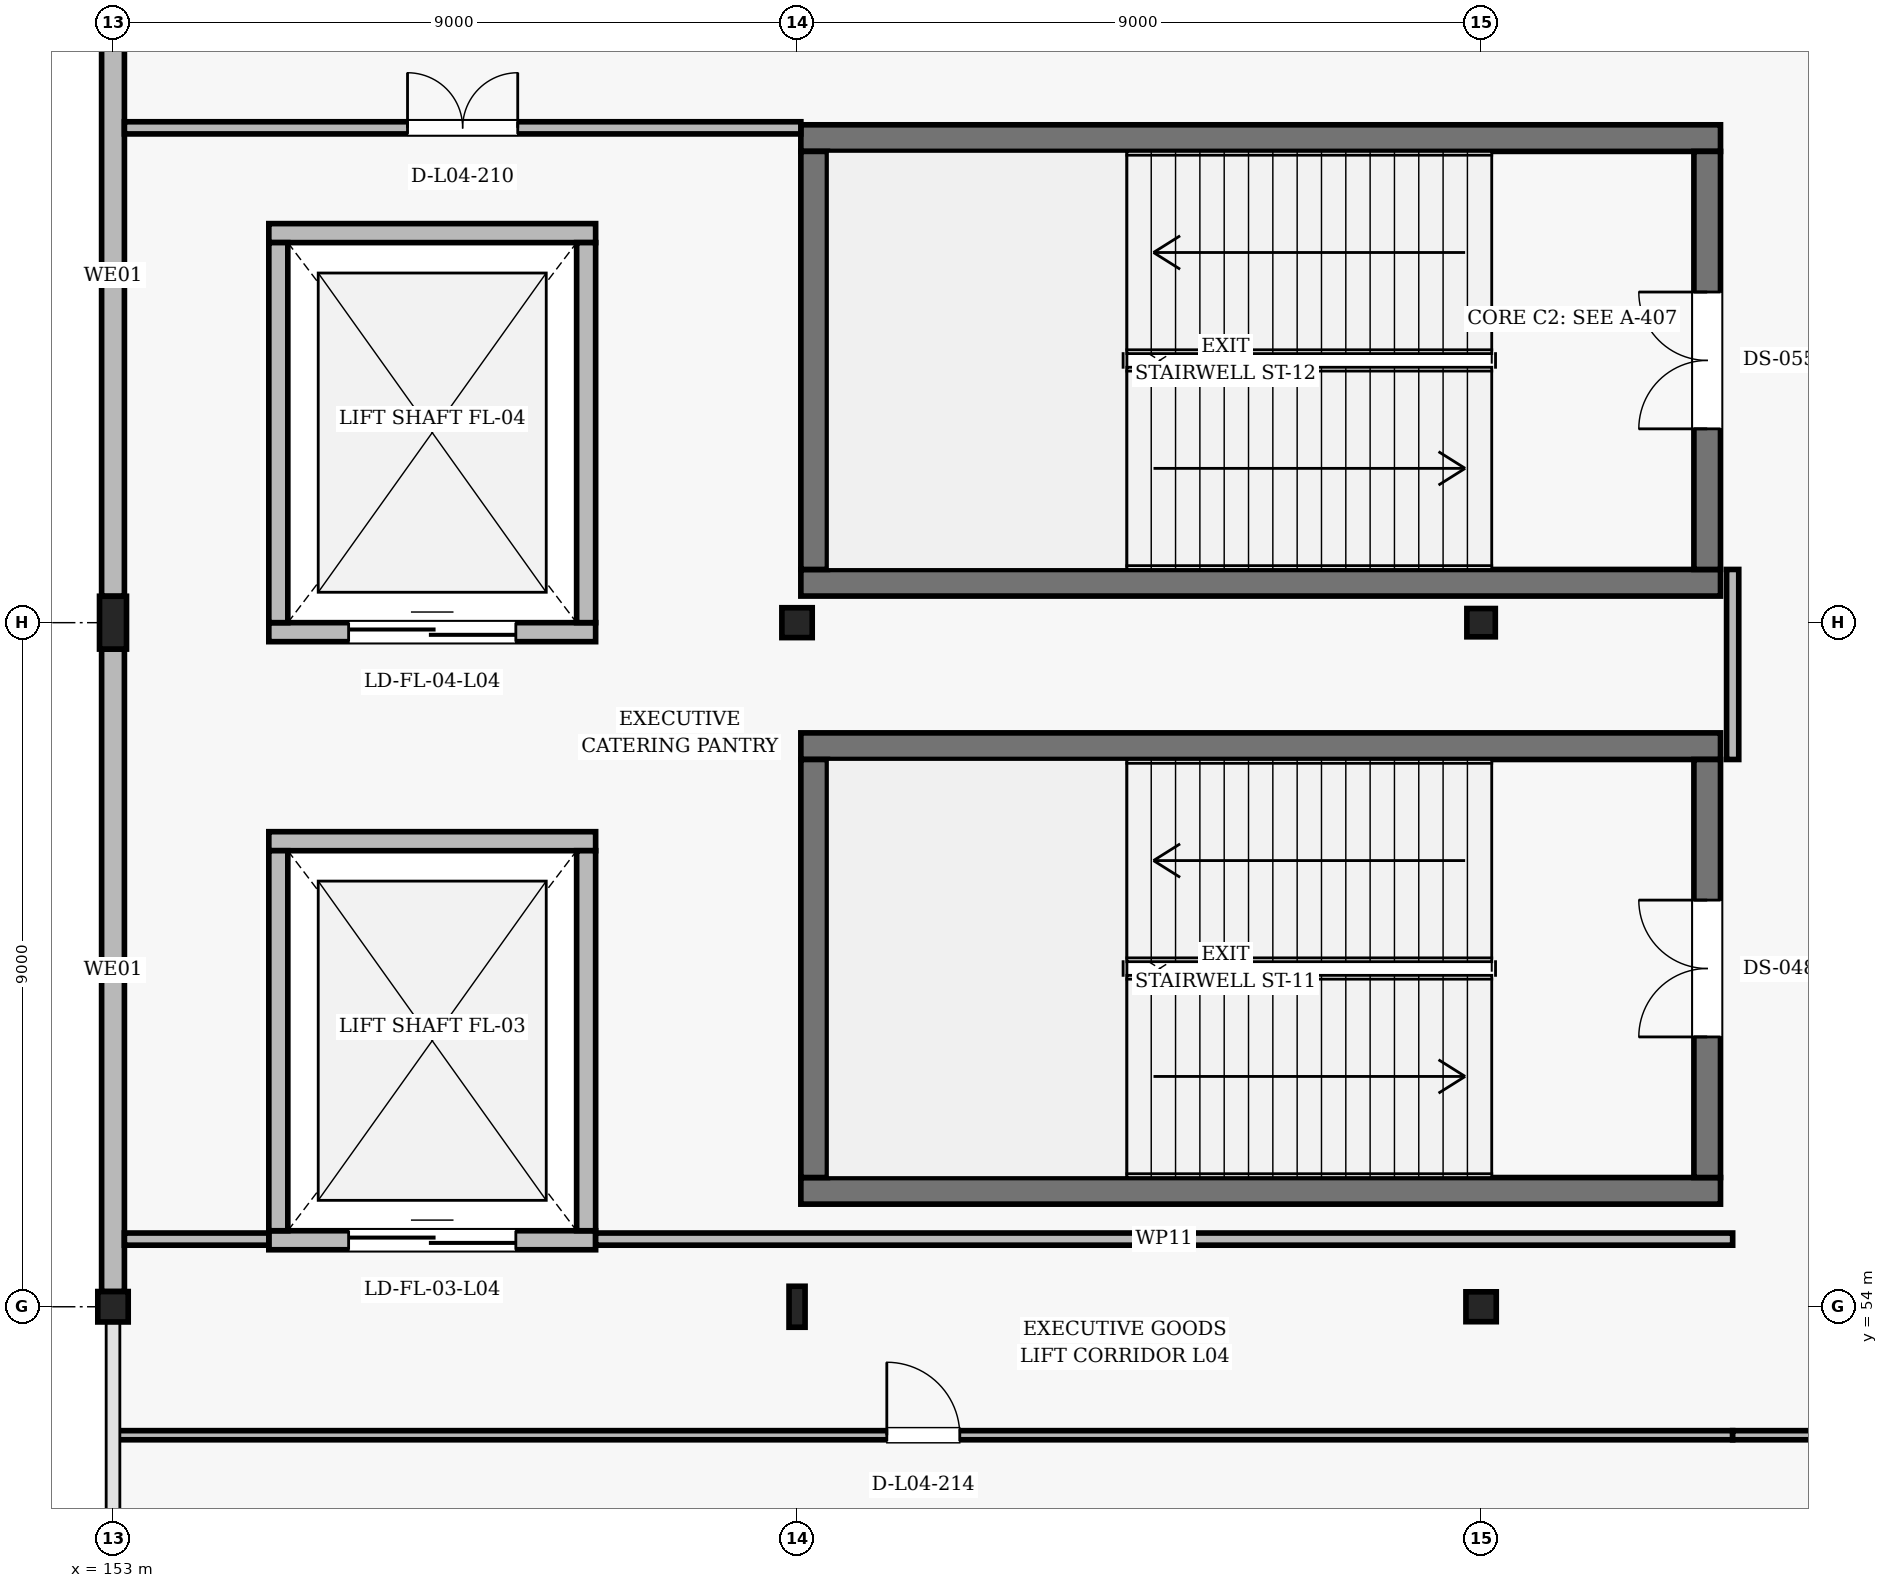
"""IFC4 building model, lengths in metres.
Left out: names, types, materials, properties, quantities, classifications, styles, units other than length and angle.
Written with IfcOpenShell. Run it as: python <this file> out.ifc"""

import sys

from ifc_helpers import new_model, si_unit, direction, frame, frame_2d, origin, origin_2d, place, context, subcontext, project, spatial, rectangle, hollow_rectangle, i_section, extrude, element, fill, save


model = new_model("IFC4")
c1 = context("Model", 3, precision=1e-05, world=origin(), true_north=direction((0.0, 1.0)))
c2 = subcontext(c1, "Body", "Model", "MODEL_VIEW")
j1 = project(units=[si_unit("LENGTHUNIT", "METRE"), si_unit("PLANEANGLEUNIT", "RADIAN")], contexts=[c1])
p1 = place(None, origin())
s1 = spatial("IfcSite", under=j1, at=p1, CompositionType="ELEMENT")
p2 = place(p1, origin())
s2 = spatial("IfcBuilding", under=s1, at=p2, CompositionType="ELEMENT")
p3 = place(p2, frame((0.0, 0.0, 20.4)))
s3 = spatial("IfcBuildingStorey", under=s2, at=p3, CompositionType="ELEMENT", Elevation=20.4)
p4 = place(p3, frame((153.0, 54.0, 0.0), z_axis=(0.0, 0.0, 1.0), x_axis=(1.0, 0.0, 0.0)))
e1 = element("IfcColumn", 1, at=p4, inside=s3, PredefinedType="COLUMN", context=c2, shape_type="SweptSolid", body=[
    extrude(hollow_rectangle(XDim=0.4, YDim=0.4, WallThickness=0.016, InnerFilletRadius=0.016, OuterFilletRadius=0.032, at=origin_2d()), origin(), (0.0, 0.0, 1.0), 4.8),
])
p5 = place(p3, frame((153.0, 63.0, 0.0), z_axis=(0.0, 0.0, 1.0), x_axis=(1.0, 0.0, 0.0)))
e2 = element("IfcColumn", 2, at=p5, inside=s3, PredefinedType="COLUMN", context=c2, shape_type="SweptSolid", body=[
    extrude(i_section(OverallWidth=0.355, OverallDepth=0.695, WebThickness=0.015, FlangeThickness=0.025, FilletRadius=0.018, at=origin_2d()), origin(), (0.0, 0.0, 1.0), 4.8),
])
p6 = place(p3, frame((162.0, 54.0, 0.0), z_axis=(0.0, 0.0, 1.0), x_axis=(1.0, 0.0, 0.0)))
e3 = element("IfcColumn", 3, at=p6, inside=s3, PredefinedType="COLUMN", context=c2, shape_type="SweptSolid", body=[
    extrude(i_section(OverallWidth=0.211, OverallDepth=0.539, WebThickness=0.012, FlangeThickness=0.019, FilletRadius=0.014, at=origin_2d()), origin(), (0.0, 0.0, 1.0), 4.8),
])
for number, where, z_axis, x_axis in (
    (4, (162.0, 63.0, 0.0), (0.0, 0.0, 1.0), (1.0, 0.0, 0.0)),
    (5, (171.0, 54.0, 0.0), (0.0, 0.0, 1.0), (1.0, 0.0, 0.0)),
):
    element("IfcColumn", number, at=place(p3, frame(where, z_axis=z_axis, x_axis=x_axis)), inside=s3, PredefinedType="COLUMN", context=c2, shape_type="SweptSolid", body=[
        extrude(i_section(OverallWidth=0.399, OverallDepth=0.393, WebThickness=0.023, FlangeThickness=0.037, FilletRadius=0.018, at=origin_2d()), origin(), (0.0, 0.0, 1.0), 4.8),
    ])
p7 = place(p3, frame((171.0, 63.0, 0.0), z_axis=(0.0, 0.0, 1.0), x_axis=(1.0, 0.0, 0.0)))
e6 = element("IfcColumn", 6, at=p7, inside=s3, PredefinedType="COLUMN", context=c2, shape_type="SweptSolid", body=[
    extrude(i_section(OverallWidth=0.374, OverallDepth=0.372, WebThickness=0.016, FlangeThickness=0.026, FilletRadius=0.016, at=origin_2d()), origin(), (0.0, 0.0, 1.0), 4.8),
])
p8 = place(p3, frame((153.0, 54.2, 0.0), z_axis=(0.0, 0.0, 1.0), x_axis=(0.0, 1.0, 0.0)))
e7 = element("IfcWall", 7, at=p8, inside=s3, PredefinedType="SOLIDWALL", context=c2, shape_type="SweptSolid", body=[
    extrude(rectangle(XDim=8.453, YDim=0.3, at=frame_2d((4.226, 0.0))), origin(), (0.0, 0.0, 1.0), 3.934),
])
p9 = place(p3, frame((153.0, 63.347, 0.0), z_axis=(0.0, 0.0, 1.0), x_axis=(0.0, 1.0, 0.0)))
e8 = element("IfcWall", 8, at=p9, inside=s3, PredefinedType="SOLIDWALL", context=c2, shape_type="SweptSolid", body=[
    extrude(rectangle(XDim=8.44, YDim=0.3, at=frame_2d((4.22, 0.0))), origin(), (0.0, 0.0, 1.0), 3.772),
])
for number, where, z_axis, x_axis in (
    (9, (162.05, 55.525, 0.0), (0.0, 0.0, 1.0), (1.0, 0.0, 0.0)),
    (10, (174.15, 61.375, 0.0), (0.0, 0.0, 1.0), (-1.0, 0.0, 0.0)),
):
    element("IfcWall", number, at=place(p3, frame(where, z_axis=z_axis, x_axis=x_axis)), inside=s3, PredefinedType="SHEAR", context=c2, shape_type="SweptSolid", body=[
        extrude(rectangle(XDim=12.1, YDim=0.35, at=frame_2d((6.05, 0.0))), origin(), (0.0, 0.0, 1.0), 4.56),
    ])
p10 = place(p3, frame((162.225, 61.2, 0.0), z_axis=(0.0, 0.0, 1.0), x_axis=(0.0, -1.0, 0.0)))
e11 = element("IfcWall", 11, at=p10, inside=s3, PredefinedType="SHEAR", context=c2, shape_type="SweptSolid", body=[
    extrude(rectangle(XDim=5.5, YDim=0.35, at=frame_2d((2.75, 0.0))), origin(), (0.0, 0.0, 1.0), 4.56),
])
p11 = place(p3, frame((173.975, 55.7, 0.0), z_axis=(0.0, 0.0, 1.0), x_axis=(0.0, 1.0, 0.0)))
e12 = element("IfcWall", 12, at=p11, inside=s3, PredefinedType="SHEAR", context=c2, shape_type="SweptSolid", body=[
    extrude(rectangle(XDim=5.5, YDim=0.35, at=frame_2d((2.75, 0.0))), origin(), (0.0, 0.0, 1.0), 4.56),
])
p12 = place(p11, frame((1.85, 0.0, 0.0)))
e13 = element("IfcOpeningElement", 13, at=p12, cuts=e12, PredefinedType="OPENING", context=c2, shape_type="SweptSolid", body=[
    extrude(rectangle(XDim=1.8, YDim=2.2, at=frame_2d((0.9, 1.1))), frame((0.0, 0.185, 0.0), z_axis=(0.0, -1.0, 0.0), x_axis=(1.0, 0.0, 0.0)), (0.0, 0.0, 1.0), 0.37),
])
for number, where, z_axis, x_axis in (
    (14, (162.05, 63.525, 0.0), (0.0, 0.0, 1.0), (1.0, 0.0, 0.0)),
    (15, (174.15, 69.375, 0.0), (0.0, 0.0, 1.0), (-1.0, 0.0, 0.0)),
):
    element("IfcWall", number, at=place(p3, frame(where, z_axis=z_axis, x_axis=x_axis)), inside=s3, PredefinedType="SHEAR", context=c2, shape_type="SweptSolid", body=[
        extrude(rectangle(XDim=12.1, YDim=0.35, at=frame_2d((6.05, 0.0))), origin(), (0.0, 0.0, 1.0), 4.56),
    ])
p13 = place(p3, frame((162.225, 69.2, 0.0), z_axis=(0.0, 0.0, 1.0), x_axis=(0.0, -1.0, 0.0)))
e16 = element("IfcWall", 16, at=p13, inside=s3, PredefinedType="SHEAR", context=c2, shape_type="SweptSolid", body=[
    extrude(rectangle(XDim=5.5, YDim=0.35, at=frame_2d((2.75, 0.0))), origin(), (0.0, 0.0, 1.0), 4.56),
])
p14 = place(p3, frame((173.975, 63.7, 0.0), z_axis=(0.0, 0.0, 1.0), x_axis=(0.0, 1.0, 0.0)))
e17 = element("IfcWall", 17, at=p14, inside=s3, PredefinedType="SHEAR", context=c2, shape_type="SweptSolid", body=[
    extrude(rectangle(XDim=5.5, YDim=0.35, at=frame_2d((2.75, 0.0))), origin(), (0.0, 0.0, 1.0), 4.56),
])
p15 = place(p14, frame((1.85, 0.0, 0.0)))
e18 = element("IfcOpeningElement", 18, at=p15, cuts=e17, PredefinedType="OPENING", context=c2, shape_type="SweptSolid", body=[
    extrude(rectangle(XDim=1.8, YDim=2.2, at=frame_2d((0.9, 1.1))), frame((0.0, 0.185, 0.0), z_axis=(0.0, -1.0, 0.0), x_axis=(1.0, 0.0, 0.0)), (0.0, 0.0, 1.0), 0.37),
])
p16 = place(p3, frame((155.05, 54.875, 0.0), z_axis=(0.0, 0.0, 1.0), x_axis=(1.0, 0.0, 0.0)))
e19 = element("IfcWall", 19, at=p16, inside=s3, PredefinedType="SOLIDWALL", context=c2, shape_type="SweptSolid", body=[
    extrude(rectangle(XDim=4.3, YDim=0.25, at=frame_2d((2.15, 0.0))), origin(), (0.0, 0.0, 1.0), 4.56),
])
p17 = place(p16, frame((1.05, 0.0, 0.0)))
e20 = element("IfcOpeningElement", 20, at=p17, cuts=e19, PredefinedType="OPENING", context=c2, shape_type="SweptSolid", body=[
    extrude(rectangle(XDim=2.2, YDim=2.5, at=frame_2d((1.1, 1.25))), frame((0.0, 0.135, 0.0), z_axis=(0.0, -1.0, 0.0), x_axis=(1.0, 0.0, 0.0)), (0.0, 0.0, 1.0), 0.27),
])
p18 = place(p3, frame((159.35, 60.125, 0.0), z_axis=(0.0, 0.0, 1.0), x_axis=(-1.0, 0.0, 0.0)))
e21 = element("IfcWall", 21, at=p18, inside=s3, PredefinedType="SOLIDWALL", context=c2, shape_type="SweptSolid", body=[
    extrude(rectangle(XDim=4.3, YDim=0.25, at=frame_2d((2.15, 0.0))), origin(), (0.0, 0.0, 1.0), 4.56),
])
for number, where, z_axis, x_axis in (
    (22, (155.175, 60.0, 0.0), (0.0, 0.0, 1.0), (0.0, -1.0, 0.0)),
    (23, (159.225, 55.0, 0.0), (0.0, 0.0, 1.0), (0.0, 1.0, 0.0)),
):
    element("IfcWall", number, at=place(p3, frame(where, z_axis=z_axis, x_axis=x_axis)), inside=s3, PredefinedType="SOLIDWALL", context=c2, shape_type="SweptSolid", body=[
        extrude(rectangle(XDim=5.0, YDim=0.25, at=frame_2d((2.5, 0.0))), origin(), (0.0, 0.0, 1.0), 4.56),
    ])
p19 = place(p3, frame((155.05, 62.875, 0.0), z_axis=(0.0, 0.0, 1.0), x_axis=(1.0, 0.0, 0.0)))
e24 = element("IfcWall", 24, at=p19, inside=s3, PredefinedType="SOLIDWALL", context=c2, shape_type="SweptSolid", body=[
    extrude(rectangle(XDim=4.3, YDim=0.25, at=frame_2d((2.15, 0.0))), origin(), (0.0, 0.0, 1.0), 4.56),
])
p20 = place(p19, frame((1.05, 0.0, 0.0)))
e25 = element("IfcOpeningElement", 25, at=p20, cuts=e24, PredefinedType="OPENING", context=c2, shape_type="SweptSolid", body=[
    extrude(rectangle(XDim=2.2, YDim=2.5, at=frame_2d((1.1, 1.25))), frame((0.0, 0.135, 0.0), z_axis=(0.0, -1.0, 0.0), x_axis=(1.0, 0.0, 0.0)), (0.0, 0.0, 1.0), 0.27),
])
p21 = place(p3, frame((159.35, 68.125, 0.0), z_axis=(0.0, 0.0, 1.0), x_axis=(-1.0, 0.0, 0.0)))
e26 = element("IfcWall", 26, at=p21, inside=s3, PredefinedType="SOLIDWALL", context=c2, shape_type="SweptSolid", body=[
    extrude(rectangle(XDim=4.3, YDim=0.25, at=frame_2d((2.15, 0.0))), origin(), (0.0, 0.0, 1.0), 4.56),
])
for number, where, z_axis, x_axis in (
    (27, (155.175, 68.0, 0.0), (0.0, 0.0, 1.0), (0.0, -1.0, 0.0)),
    (28, (159.225, 63.0, 0.0), (0.0, 0.0, 1.0), (0.0, 1.0, 0.0)),
):
    element("IfcWall", number, at=place(p3, frame(where, z_axis=z_axis, x_axis=x_axis)), inside=s3, PredefinedType="SOLIDWALL", context=c2, shape_type="SweptSolid", body=[
        extrude(rectangle(XDim=5.0, YDim=0.25, at=frame_2d((2.5, 0.0))), origin(), (0.0, 0.0, 1.0), 4.56),
    ])
p22 = place(p3, frame((153.15, 69.51, 0.0), z_axis=(0.0, 0.0, 1.0), x_axis=(1.0, 0.0, 0.0)))
e29 = element("IfcWall", 29, at=p22, inside=s3, PredefinedType="PARTITIONING", context=c2, shape_type="SweptSolid", body=[
    extrude(rectangle(XDim=8.9, YDim=0.16, at=frame_2d((4.45, 0.0))), origin(), (0.0, 0.0, 1.0), 3.772),
])
p23 = place(p22, frame((3.725, 0.0, 0.0)))
e30 = element("IfcOpeningElement", 30, at=p23, cuts=e29, PredefinedType="OPENING", context=c2, shape_type="SweptSolid", body=[
    extrude(rectangle(XDim=1.45, YDim=2.3, at=frame_2d((0.725, 1.15))), frame((0.0, 0.09, 0.0), z_axis=(0.0, -1.0, 0.0), x_axis=(1.0, 0.0, 0.0)), (0.0, 0.0, 1.0), 0.18),
])
p24 = place(p3, frame((174.31, 63.7, 0.0), z_axis=(0.0, 0.0, 1.0), x_axis=(0.0, -1.0, 0.0)))
e31 = element("IfcWall", 31, at=p24, inside=s3, PredefinedType="PARTITIONING", context=c2, shape_type="SweptSolid", body=[
    extrude(rectangle(XDim=2.5, YDim=0.16, at=frame_2d((1.25, 0.0))), origin(), (0.0, 0.0, 1.0), 3.85),
])
p25 = place(p3, frame((174.31, 54.89, 0.0), z_axis=(0.0, 0.0, 1.0), x_axis=(-1.0, 0.0, 0.0)))
e32 = element("IfcWall", 32, at=p25, inside=s3, PredefinedType="PARTITIONING", context=c2, shape_type="SweptSolid", body=[
    extrude(rectangle(XDim=14.96, YDim=0.16, at=frame_2d((7.48, 0.0))), origin(), (0.0, 0.0, 1.0), 3.861),
])
p26 = place(p3, frame((155.05, 54.89, 0.0), z_axis=(0.0, 0.0, 1.0), x_axis=(-1.0, 0.0, 0.0)))
e33 = element("IfcWall", 33, at=p26, inside=s3, PredefinedType="PARTITIONING", context=c2, shape_type="SweptSolid", body=[
    extrude(rectangle(XDim=1.9, YDim=0.16, at=frame_2d((0.95, 0.0))), origin(), (0.0, 0.0, 1.0), 3.934),
])
p27 = place(p3, frame((153.012, 52.31, 0.0), z_axis=(0.0, 0.0, 1.0), x_axis=(1.0, 0.0, 0.0)))
e34 = element("IfcWall", 34, at=p27, inside=s3, PredefinedType="PARTITIONING", context=c2, shape_type="SweptSolid", body=[
    extrude(rectangle(XDim=21.298, YDim=0.12, at=frame_2d((10.649, 0.0))), origin(), (0.0, 0.0, 1.0), 3.69),
])
p28 = place(p27, frame((10.169, 0.0, 0.0)))
e35 = element("IfcOpeningElement", 35, at=p28, cuts=e34, PredefinedType="OPENING", context=c2, shape_type="SweptSolid", body=[
    extrude(rectangle(XDim=0.96, YDim=2.15, at=frame_2d((0.48, 1.075))), frame((0.0, 0.07, 0.0), z_axis=(0.0, -1.0, 0.0), x_axis=(1.0, 0.0, 0.0)), (0.0, 0.0, 1.0), 0.14),
])
p29 = place(p3, frame((174.31, 52.31, 0.0), z_axis=(0.0, 0.0, 1.0), x_axis=(1.0, 0.0, 0.0)))
e36 = element("IfcWall", 36, at=p29, inside=s3, PredefinedType="PARTITIONING", context=c2, shape_type="SweptSolid", body=[
    extrude(rectangle(XDim=4.94, YDim=0.12, at=frame_2d((2.47, 0.0))), origin(), (0.0, 0.0, 1.0), 4.088),
])
p30 = place(p12, origin())
e37 = element("IfcDoor", 37, at=p30, inside=s3, OperationType="DOUBLE_DOOR_SINGLE_SWING", PredefinedType="DOOR", context=c2, shape_type="SweptSolid", body=[
    extrude(rectangle(XDim=1.8, YDim=2.2, at=frame_2d((0.9, 1.1))), frame((0.0, 0.025, 0.0), z_axis=(0.0, -1.0, 0.0), x_axis=(1.0, 0.0, 0.0)), (0.0, 0.0, 1.0), 0.05),
])
fill(e13, e37)
p31 = place(p15, origin())
e38 = element("IfcDoor", 38, at=p31, inside=s3, OperationType="DOUBLE_DOOR_SINGLE_SWING", PredefinedType="DOOR", context=c2, shape_type="SweptSolid", body=[
    extrude(rectangle(XDim=1.8, YDim=2.2, at=frame_2d((0.9, 1.1))), frame((0.0, 0.025, 0.0), z_axis=(0.0, -1.0, 0.0), x_axis=(1.0, 0.0, 0.0)), (0.0, 0.0, 1.0), 0.05),
])
fill(e18, e38)
p32 = place(p17, origin())
e39 = element("IfcDoor", 39, at=p32, inside=s3, OperationType="DOUBLE_DOOR_SLIDING", PredefinedType="DOOR", context=c2, shape_type="SweptSolid", body=[
    extrude(rectangle(XDim=2.2, YDim=2.5, at=frame_2d((1.1, 1.25))), frame((0.0, 0.025, 0.0), z_axis=(0.0, -1.0, 0.0), x_axis=(1.0, 0.0, 0.0)), (0.0, 0.0, 1.0), 0.05),
])
fill(e20, e39)
p33 = place(p20, origin())
e40 = element("IfcDoor", 40, at=p33, inside=s3, OperationType="DOUBLE_DOOR_SLIDING", PredefinedType="DOOR", context=c2, shape_type="SweptSolid", body=[
    extrude(rectangle(XDim=2.2, YDim=2.5, at=frame_2d((1.1, 1.25))), frame((0.0, 0.025, 0.0), z_axis=(0.0, -1.0, 0.0), x_axis=(1.0, 0.0, 0.0)), (0.0, 0.0, 1.0), 0.05),
])
fill(e25, e40)
p34 = place(p23, origin())
e41 = element("IfcDoor", 41, at=p34, inside=s3, OperationType="DOUBLE_DOOR_SINGLE_SWING", PredefinedType="DOOR", context=c2, shape_type="SweptSolid", body=[
    extrude(rectangle(XDim=1.45, YDim=2.3, at=frame_2d((0.725, 1.15))), frame((0.0, 0.025, 0.0), z_axis=(0.0, -1.0, 0.0), x_axis=(1.0, 0.0, 0.0)), (0.0, 0.0, 1.0), 0.05),
])
fill(e30, e41)
p35 = place(p28, origin())
e42 = element("IfcDoor", 42, at=p35, inside=s3, OperationType="SINGLE_SWING_LEFT", PredefinedType="DOOR", context=c2, shape_type="SweptSolid", body=[
    extrude(rectangle(XDim=0.96, YDim=2.15, at=frame_2d((0.48, 1.075))), frame((0.0, 0.025, 0.0), z_axis=(0.0, -1.0, 0.0), x_axis=(1.0, 0.0, 0.0)), (0.0, 0.0, 1.0), 0.05),
])
fill(e35, e42)
save(model, sys.argv[1])
